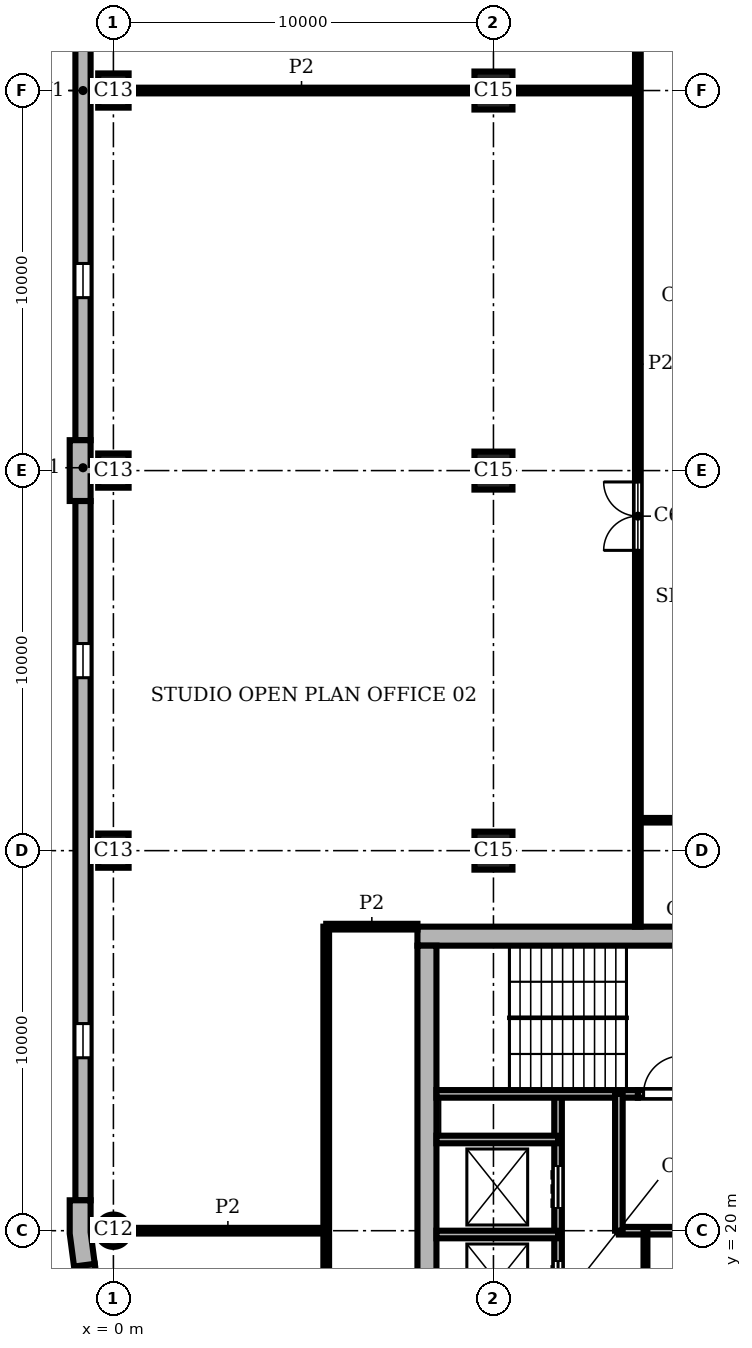
"""IFC4 building model, lengths in metres.
Left out: names, types, materials, properties, quantities, classifications, styles, units other than length and angle.
Written with IfcOpenShell. Run it as: python <this file> out.ifc"""

import sys

from ifc_helpers import new_model, si_unit, direction, frame, frame_2d, origin, origin_2d, place, context, subcontext, project, spatial, polyline, rectangle, circle, outline, extrude, element, fill, save


model = new_model("IFC4")
c1 = context("Model", 3, precision=1e-05, world=origin(), true_north=direction((0.0, 1.0)))
c2 = subcontext(c1, "Body", "Model", "MODEL_VIEW")
j1 = project(units=[si_unit("LENGTHUNIT", "METRE"), si_unit("PLANEANGLEUNIT", "RADIAN")], contexts=[c1])
p1 = place(None, origin())
s1 = spatial("IfcSite", under=j1, at=p1, CompositionType="ELEMENT")
p2 = place(p1, origin())
s2 = spatial("IfcBuilding", under=s1, at=p2, CompositionType="ELEMENT")
p3 = place(p2, frame((0.0, 0.0, 294.3)))
s3 = spatial("IfcBuildingStorey", under=s2, at=p3, CompositionType="ELEMENT", Elevation=294.3)
for number, where, z_axis, x_axis in (
    (1, (0.0, 50.0, 0.0), (0.0, 0.0, 1.0), (0.0, 1.0, 0.0)),
    (2, (0.0, 40.0, 0.0), (0.0, 0.0, 1.0), (0.0, 1.0, 0.0)),
    (3, (0.0, 30.0, 0.0), (0.0, 0.0, 1.0), (0.0, 1.0, 0.0)),
):
    element("IfcColumn", number, at=place(p3, frame(where, z_axis=z_axis, x_axis=x_axis)), inside=s3, PredefinedType="COLUMN", context=c2, shape_type="SweptSolid", body=[
        extrude(rectangle(XDim=0.9, YDim=0.8, at=origin_2d()), origin(), (0.0, 0.0, 1.0), 3.9),
    ])
p4 = place(p3, frame((0.0, 20.0, 0.0), z_axis=(0.0, 0.0, 1.0), x_axis=(1.0, 0.0, 0.0)))
e4 = element("IfcColumn", 4, at=p4, inside=s3, PredefinedType="COLUMN", context=c2, shape_type="SweptSolid", body=[
    extrude(circle(Radius=0.425, at=origin_2d()), origin(), (0.0, 0.0, 1.0), 3.9),
])
for number, where, z_axis, x_axis in (
    (5, (10.0, 30.0, 0.0), (0.0, 0.0, 1.0), (1.0, 0.0, 0.0)),
    (6, (10.0, 40.0, 0.0), (0.0, 0.0, 1.0), (1.0, 0.0, 0.0)),
    (7, (10.0, 50.0, 0.0), (0.0, 0.0, 1.0), (1.0, 0.0, 0.0)),
):
    element("IfcColumn", number, at=place(p3, frame(where, z_axis=z_axis, x_axis=x_axis)), inside=s3, PredefinedType="COLUMN", context=c2, shape_type="SweptSolid", body=[
        extrude(rectangle(XDim=1.0, YDim=1.0, at=origin_2d()), origin(), (0.0, 0.0, 1.0), 3.9),
    ])
p5 = place(p3, frame((28.0, 27.75, 0.0), z_axis=(0.0, 0.0, 1.0), x_axis=(-1.0, 0.0, 0.0)))
e8 = element("IfcWall", 8, at=p5, inside=s3, PredefinedType="SHEAR", context=c2, shape_type="SweptSolid", body=[
    extrude(rectangle(XDim=20.0, YDim=0.5, at=frame_2d((10.0, 0.0))), origin(), (0.0, 0.0, 1.0), 3.9),
])
p6 = place(p3, frame((8.25, 27.5, 0.0), z_axis=(0.0, 0.0, 1.0), x_axis=(0.0, -1.0, 0.0)))
e9 = element("IfcWall", 9, at=p6, inside=s3, PredefinedType="SHEAR", context=c2, shape_type="SweptSolid", body=[
    extrude(rectangle(XDim=19.0, YDim=0.5, at=frame_2d((9.5, 0.0))), origin(), (0.0, 0.0, 1.0), 3.9),
])
p7 = place(p3, origin())
e10 = element("IfcWall", 10, at=p7, inside=s3, PredefinedType="SOLIDWALL", context=c2, shape_type="SweptSolid", body=[
    extrude(outline(polyline([(-0.6, 39.2), (-0.6, 39.85), (-0.45, 39.85), (-0.45, 40.15), (-0.6, 40.15), (-0.6, 40.8), (-1.0, 40.8), (-1.15, 40.8), (-1.15, 40.0), (-1.15, 39.2), (-1.0, 39.2), (-0.6, 39.2)])), origin(), (0.0, 0.0, 1.0), 3.9),
])
e11 = element("IfcWall", 11, at=p7, inside=s3, PredefinedType="SOLIDWALL", context=c2, shape_type="SweptSolid", body=[
    extrude(outline(polyline([(-1.0, 20.8), (-1.15, 20.8), (-1.15, 19.925), (-1.036, 19.057), (-0.887, 19.076), (-0.49, 19.128), (-0.6, 19.961), (-0.6, 20.8), (-1.0, 20.8)])), origin(), (0.0, 0.0, 1.0), 3.9),
])
p8 = place(p3, frame((-0.8, 59.2, 0.0), z_axis=(0.0, 0.0, 1.0), x_axis=(0.0, -1.0, 0.0)))
e12 = element("IfcWall", 12, at=p8, inside=s3, PredefinedType="SOLIDWALL", context=c2, shape_type="SweptSolid", body=[
    extrude(rectangle(XDim=18.4, YDim=0.4, at=frame_2d((9.2, 0.0))), origin(), (0.0, 0.0, 1.0), 3.9),
])
p9 = place(p8, frame((3.75, 0.0, 0.9)))
e13 = element("IfcOpeningElement", 13, at=p9, cuts=e12, PredefinedType="OPENING", context=c2, shape_type="SweptSolid", body=[
    extrude(rectangle(XDim=0.9, YDim=2.35, at=frame_2d((0.45, 1.175))), frame((0.0, 0.21, 0.0), z_axis=(0.0, -1.0, 0.0), x_axis=(1.0, 0.0, 0.0)), (0.0, 0.0, 1.0), 0.42),
])
p10 = place(p8, frame((13.75, 0.0, 0.9)))
e14 = element("IfcOpeningElement", 14, at=p10, cuts=e12, PredefinedType="OPENING", context=c2, shape_type="SweptSolid", body=[
    extrude(rectangle(XDim=0.9, YDim=2.35, at=frame_2d((0.45, 1.175))), frame((0.0, 0.21, 0.0), z_axis=(0.0, -1.0, 0.0), x_axis=(1.0, 0.0, 0.0)), (0.0, 0.0, 1.0), 0.42),
])
p11 = place(p3, frame((-0.8, 39.2, 0.0), z_axis=(0.0, 0.0, 1.0), x_axis=(0.0, -1.0, 0.0)))
e15 = element("IfcWall", 15, at=p11, inside=s3, PredefinedType="SOLIDWALL", context=c2, shape_type="SweptSolid", body=[
    extrude(rectangle(XDim=18.4, YDim=0.4, at=frame_2d((9.2, 0.0))), origin(), (0.0, 0.0, 1.0), 3.9),
])
p12 = place(p11, frame((3.75, 0.0, 0.9)))
e16 = element("IfcOpeningElement", 16, at=p12, cuts=e15, PredefinedType="OPENING", context=c2, shape_type="SweptSolid", body=[
    extrude(rectangle(XDim=0.9, YDim=2.35, at=frame_2d((0.45, 1.175))), frame((0.0, 0.21, 0.0), z_axis=(0.0, -1.0, 0.0), x_axis=(1.0, 0.0, 0.0)), (0.0, 0.0, 1.0), 0.42),
])
p13 = place(p11, frame((13.75, 0.0, 0.9)))
e17 = element("IfcOpeningElement", 17, at=p13, cuts=e15, PredefinedType="OPENING", context=c2, shape_type="SweptSolid", body=[
    extrude(rectangle(XDim=0.9, YDim=2.35, at=frame_2d((0.45, 1.175))), frame((0.0, 0.21, 0.0), z_axis=(0.0, -1.0, 0.0), x_axis=(1.0, 0.0, 0.0)), (0.0, 0.0, 1.0), 0.42),
])
p14 = place(p3, frame((-0.689, 19.102, 0.0), z_axis=(0.0, 0.0, 1.0), x_axis=(0.130514280502, -0.991446429508, 0.0)))
e18 = element("IfcWall", 18, at=p14, inside=s3, PredefinedType="SOLIDWALL", context=c2, shape_type="SweptSolid", body=[
    extrude(rectangle(XDim=4.121, YDim=0.4, at=frame_2d((2.061, 0.0))), origin(), (0.0, 0.0, 1.0), 3.9),
])
p15 = place(p14, frame((1.611, 0.0, 0.9)))
e19 = element("IfcOpeningElement", 19, at=p15, cuts=e18, PredefinedType="OPENING", context=c2, shape_type="SweptSolid", body=[
    extrude(rectangle(XDim=0.9, YDim=2.35, at=frame_2d((0.45, 1.175))), frame((0.0, 0.21, 0.0), z_axis=(0.0, -1.0, 0.0), x_axis=(1.0, 0.0, 0.0)), (0.0, 0.0, 1.0), 0.42),
])
p16 = place(p3, frame((8.5, 19.9, 0.0), z_axis=(0.0, 0.0, 1.0), x_axis=(1.0, 0.0, 0.0)))
e20 = element("IfcWall", 20, at=p16, inside=s3, PredefinedType="SHEAR", context=c2, shape_type="SweptSolid", body=[
    extrude(rectangle(XDim=3.2, YDim=0.2, at=frame_2d((1.6, 0.0))), origin(), (0.0, 0.0, 1.0), 3.58),
])
p17 = place(p3, frame((13.3, 20.0, 0.0), z_axis=(0.0, 0.0, 1.0), x_axis=(1.0, 0.0, 0.0)))
e21 = element("IfcWall", 21, at=p17, inside=s3, PredefinedType="SHEAR", context=c2, shape_type="SweptSolid", body=[
    extrude(rectangle(XDim=4.7, YDim=0.2, at=frame_2d((2.35, 0.0))), origin(), (0.0, 0.0, 1.0), 3.58),
])
p18 = place(p3, frame((8.5, 22.4, 0.0), z_axis=(0.0, 0.0, 1.0), x_axis=(1.0, 0.0, 0.0)))
e22 = element("IfcWall", 22, at=p18, inside=s3, PredefinedType="SHEAR", context=c2, shape_type="SweptSolid", body=[
    extrude(rectangle(XDim=3.2, YDim=0.2, at=frame_2d((1.6, 0.0))), origin(), (0.0, 0.0, 1.0), 3.58),
])
p19 = place(p3, frame((8.5, 23.6, 0.0), z_axis=(0.0, 0.0, 1.0), x_axis=(1.0, 0.0, 0.0)))
e23 = element("IfcWall", 23, at=p19, inside=s3, PredefinedType="SHEAR", context=c2, shape_type="SweptSolid", body=[
    extrude(rectangle(XDim=5.3, YDim=0.2, at=frame_2d((2.65, 0.0))), origin(), (0.0, 0.0, 1.0), 3.58),
])
p20 = place(p3, frame((13.8, 23.6, 0.0), z_axis=(0.0, 0.0, 1.0), x_axis=(1.0, 0.0, 0.0)))
e24 = element("IfcWall", 24, at=p20, inside=s3, PredefinedType="SHEAR", context=c2, shape_type="SweptSolid", body=[
    extrude(rectangle(XDim=13.7, YDim=0.2, at=frame_2d((6.85, 0.0))), origin(), (0.0, 0.0, 1.0), 3.58),
])
p21 = place(p20, frame((2.4, 0.0, 0.0)))
e25 = element("IfcOpeningElement", 25, at=p21, cuts=e24, PredefinedType="OPENING", context=c2, shape_type="SweptSolid", body=[
    extrude(rectangle(XDim=1.1, YDim=2.1, at=frame_2d((0.55, 1.05))), frame((0.0, 0.11, 0.0), z_axis=(0.0, -1.0, 0.0), x_axis=(1.0, 0.0, 0.0)), (0.0, 0.0, 1.0), 0.22),
])
p22 = place(p20, frame((4.9, 0.0, 0.0)))
e26 = element("IfcOpeningElement", 26, at=p22, cuts=e24, PredefinedType="OPENING", context=c2, shape_type="SweptSolid", body=[
    extrude(rectangle(XDim=1.1, YDim=2.1, at=frame_2d((0.55, 1.05))), frame((0.0, 0.11, 0.0), z_axis=(0.0, -1.0, 0.0), x_axis=(1.0, 0.0, 0.0)), (0.0, 0.0, 1.0), 0.22),
])
p23 = place(p20, frame((0.15, 0.0, 0.0)))
e27 = element("IfcOpeningElement", 27, at=p23, cuts=e24, PredefinedType="OPENING", context=c2, shape_type="SweptSolid", body=[
    extrude(rectangle(XDim=1.0, YDim=2.1, at=frame_2d((0.5, 1.05))), frame((0.0, 0.11, 0.0), z_axis=(0.0, -1.0, 0.0), x_axis=(1.0, 0.0, 0.0)), (0.0, 0.0, 1.0), 0.22),
])
p24 = place(p3, frame((11.7, 12.4, 0.0), z_axis=(0.0, 0.0, 1.0), x_axis=(0.0, 1.0, 0.0)))
e28 = element("IfcWall", 28, at=p24, inside=s3, PredefinedType="SHEAR", context=c2, shape_type="SweptSolid", body=[
    extrude(rectangle(XDim=11.2, YDim=0.2, at=frame_2d((5.6, 0.0))), origin(), (0.0, 0.0, 1.0), 3.58),
])
p25 = place(p24, frame((0.7, 0.0, 0.0)))
e29 = element("IfcOpeningElement", 29, at=p25, cuts=e28, PredefinedType="OPENING", context=c2, shape_type="SweptSolid", body=[
    extrude(rectangle(XDim=1.1, YDim=2.1, at=frame_2d((0.55, 1.05))), frame((0.0, 0.11, 0.0), z_axis=(0.0, -1.0, 0.0), x_axis=(1.0, 0.0, 0.0)), (0.0, 0.0, 1.0), 0.22),
])
p26 = place(p24, frame((3.2, 0.0, 0.0)))
e30 = element("IfcOpeningElement", 30, at=p26, cuts=e28, PredefinedType="OPENING", context=c2, shape_type="SweptSolid", body=[
    extrude(rectangle(XDim=1.1, YDim=2.1, at=frame_2d((0.55, 1.05))), frame((0.0, 0.11, 0.0), z_axis=(0.0, -1.0, 0.0), x_axis=(1.0, 0.0, 0.0)), (0.0, 0.0, 1.0), 0.22),
])
p27 = place(p24, frame((5.7, 0.0, 0.0)))
e31 = element("IfcOpeningElement", 31, at=p27, cuts=e28, PredefinedType="OPENING", context=c2, shape_type="SweptSolid", body=[
    extrude(rectangle(XDim=1.1, YDim=2.1, at=frame_2d((0.55, 1.05))), frame((0.0, 0.11, 0.0), z_axis=(0.0, -1.0, 0.0), x_axis=(1.0, 0.0, 0.0)), (0.0, 0.0, 1.0), 0.22),
])
p28 = place(p24, frame((8.2, 0.0, 0.0)))
e32 = element("IfcOpeningElement", 32, at=p28, cuts=e28, PredefinedType="OPENING", context=c2, shape_type="SweptSolid", body=[
    extrude(rectangle(XDim=1.1, YDim=2.1, at=frame_2d((0.55, 1.05))), frame((0.0, 0.11, 0.0), z_axis=(0.0, -1.0, 0.0), x_axis=(1.0, 0.0, 0.0)), (0.0, 0.0, 1.0), 0.22),
])
p29 = place(p3, frame((13.3, 20.0, 0.0), z_axis=(0.0, 0.0, 1.0), x_axis=(0.0, 1.0, 0.0)))
e33 = element("IfcWall", 33, at=p29, inside=s3, PredefinedType="SHEAR", context=c2, shape_type="SweptSolid", body=[
    extrude(rectangle(XDim=3.6, YDim=0.2, at=frame_2d((1.8, 0.0))), origin(), (0.0, 0.0, 1.0), 3.58),
])
p30 = place(p3, frame((14.0, 16.2, 0.0), z_axis=(0.0, 0.0, 1.0), x_axis=(0.0, 1.0, 0.0)))
e34 = element("IfcWall", 34, at=p30, inside=s3, PredefinedType="PARTITIONING", context=c2, shape_type="SweptSolid", body=[
    extrude(rectangle(XDim=3.8, YDim=0.1, at=frame_2d((1.9, 0.0))), origin(), (0.0, 0.0, 1.0), 3.58),
])
p31 = place(p3, frame((5.6, 5.6, 0.0), z_axis=(0.0, 0.0, 1.0), x_axis=(0.0, 1.0, 0.0)))
e35 = element("IfcWall", 35, at=p31, inside=s3, PredefinedType="PARTITIONING", context=c2, shape_type="SweptSolid", body=[
    extrude(rectangle(XDim=22.4, YDim=0.15, at=frame_2d((11.2, 0.0))), origin(), (0.0, 0.0, 1.0), 3.58),
])
p32 = place(p31, frame((4.1, 0.0, 0.0)))
e36 = element("IfcOpeningElement", 36, at=p32, cuts=e35, PredefinedType="OPENING", context=c2, shape_type="SweptSolid", body=[
    extrude(rectangle(XDim=0.8, YDim=2.1, at=frame_2d((0.4, 1.05))), frame((0.0, 0.085, 0.0), z_axis=(0.0, -1.0, 0.0), x_axis=(1.0, 0.0, 0.0)), (0.0, 0.0, 1.0), 0.17),
])
p33 = place(p31, frame((11.5, 0.0, 0.0)))
e37 = element("IfcOpeningElement", 37, at=p33, cuts=e35, PredefinedType="OPENING", context=c2, shape_type="SweptSolid", body=[
    extrude(rectangle(XDim=1.1, YDim=2.1, at=frame_2d((0.55, 1.05))), frame((0.0, 0.085, 0.0), z_axis=(0.0, -1.0, 0.0), x_axis=(1.0, 0.0, 0.0)), (0.0, 0.0, 1.0), 0.17),
])
p34 = place(p3, frame((13.8, 28.0, 0.0), z_axis=(0.0, 0.0, 1.0), x_axis=(0.0, 1.0, 0.0)))
e38 = element("IfcWall", 38, at=p34, inside=s3, PredefinedType="PARTITIONING", context=c2, shape_type="SweptSolid", body=[
    extrude(rectangle(XDim=29.6, YDim=0.15, at=frame_2d((14.8, 0.0))), origin(), (0.0, 0.0, 1.0), 3.58),
])
p35 = place(p34, frame((9.901, 0.0, 0.0)))
e39 = element("IfcOpeningElement", 39, at=p35, cuts=e38, PredefinedType="OPENING", context=c2, shape_type="SweptSolid", body=[
    extrude(rectangle(XDim=1.8, YDim=2.1, at=frame_2d((0.9, 1.05))), frame((0.0, 0.085, 0.0), z_axis=(0.0, -1.0, 0.0), x_axis=(1.0, 0.0, 0.0)), (0.0, 0.0, 1.0), 0.17),
])
p36 = place(p3, frame((0.425, 20.0, 0.0), z_axis=(0.0, 0.0, 1.0), x_axis=(1.0, 0.0, 0.0)))
e40 = element("IfcWall", 40, at=p36, inside=s3, PredefinedType="PARTITIONING", context=c2, shape_type="SweptSolid", body=[
    extrude(rectangle(XDim=5.175, YDim=0.15, at=frame_2d((2.587, 0.0))), origin(), (0.0, 0.0, 1.0), 3.58),
])
p37 = place(p3, frame((5.6, 28.0, 0.0), z_axis=(0.0, 0.0, 1.0), x_axis=(1.0, 0.0, 0.0)))
e41 = element("IfcWall", 41, at=p37, inside=s3, PredefinedType="PARTITIONING", context=c2, shape_type="SweptSolid", body=[
    extrude(rectangle(XDim=2.4, YDim=0.15, at=frame_2d((1.2, 0.0))), origin(), (0.0, 0.0, 1.0), 3.58),
])
p38 = place(p3, frame((0.4, 50.0, 0.0), z_axis=(0.0, 0.0, 1.0), x_axis=(1.0, 0.0, 0.0)))
e42 = element("IfcWall", 42, at=p38, inside=s3, PredefinedType="PARTITIONING", context=c2, shape_type="SweptSolid", body=[
    extrude(rectangle(XDim=9.1, YDim=0.15, at=frame_2d((4.55, 0.0))), origin(), (0.0, 0.0, 1.0), 3.58),
])
p39 = place(p3, frame((10.5, 50.0, 0.0), z_axis=(0.0, 0.0, 1.0), x_axis=(1.0, 0.0, 0.0)))
e43 = element("IfcWall", 43, at=p39, inside=s3, PredefinedType="PARTITIONING", context=c2, shape_type="SweptSolid", body=[
    extrude(rectangle(XDim=3.3, YDim=0.15, at=frame_2d((1.65, 0.0))), origin(), (0.0, 0.0, 1.0), 3.58),
])
p40 = place(p3, frame((13.802, 30.8, 0.0), z_axis=(0.0, 0.0, 1.0), x_axis=(1.0, 0.0, 0.0)))
e44 = element("IfcWall", 44, at=p40, inside=s3, PredefinedType="PARTITIONING", context=c2, shape_type="SweptSolid", body=[
    extrude(rectangle(XDim=16.798, YDim=0.12, at=frame_2d((8.399, 0.0))), origin(), (0.0, 0.0, 1.0), 3.58),
])
p41 = place(p40, frame((7.35, 0.0, 0.0)))
e45 = element("IfcOpeningElement", 45, at=p41, cuts=e44, PredefinedType="OPENING", context=c2, shape_type="SweptSolid", body=[
    extrude(rectangle(XDim=1.8, YDim=2.1, at=frame_2d((0.9, 1.05))), frame((0.0, 0.07, 0.0), z_axis=(0.0, -1.0, 0.0), x_axis=(1.0, 0.0, 0.0)), (0.0, 0.0, 1.0), 0.14),
])
p42 = place(p10, origin())
e46 = element("IfcWindow", 46, at=p42, inside=s3, PartitioningType="SINGLE_PANEL", PredefinedType="WINDOW", context=c2, shape_type="SweptSolid", body=[
    extrude(rectangle(XDim=0.9, YDim=2.35, at=frame_2d((0.45, 1.175))), frame((0.0, 0.16, 0.0), z_axis=(0.0, -1.0, 0.0), x_axis=(1.0, 0.0, 0.0)), (0.0, 0.0, 1.0), 0.06),
])
fill(e14, e46)
p43 = place(p12, origin())
e47 = element("IfcWindow", 47, at=p43, inside=s3, PartitioningType="SINGLE_PANEL", PredefinedType="WINDOW", context=c2, shape_type="SweptSolid", body=[
    extrude(rectangle(XDim=0.9, YDim=2.35, at=frame_2d((0.45, 1.175))), frame((0.0, 0.16, 0.0), z_axis=(0.0, -1.0, 0.0), x_axis=(1.0, 0.0, 0.0)), (0.0, 0.0, 1.0), 0.06),
])
fill(e16, e47)
p44 = place(p13, origin())
e48 = element("IfcWindow", 48, at=p44, inside=s3, PartitioningType="SINGLE_PANEL", PredefinedType="WINDOW", context=c2, shape_type="SweptSolid", body=[
    extrude(rectangle(XDim=0.9, YDim=2.35, at=frame_2d((0.45, 1.175))), frame((0.0, 0.16, 0.0), z_axis=(0.0, -1.0, 0.0), x_axis=(1.0, 0.0, 0.0)), (0.0, 0.0, 1.0), 0.06),
])
fill(e17, e48)
p45 = place(p27, origin())
e49 = element("IfcDoor", 49, at=p45, inside=s3, OperationType="DOUBLE_DOOR_SLIDING", PredefinedType="DOOR", context=c2, shape_type="SweptSolid", body=[
    extrude(rectangle(XDim=1.1, YDim=2.1, at=frame_2d((0.55, 1.05))), frame((0.0, 0.025, 0.0), z_axis=(0.0, -1.0, 0.0), x_axis=(1.0, 0.0, 0.0)), (0.0, 0.0, 1.0), 0.05),
])
fill(e31, e49)
p46 = place(p28, origin())
e50 = element("IfcDoor", 50, at=p46, inside=s3, OperationType="DOUBLE_DOOR_SLIDING", PredefinedType="DOOR", context=c2, shape_type="SweptSolid", body=[
    extrude(rectangle(XDim=1.1, YDim=2.1, at=frame_2d((0.55, 1.05))), frame((0.0, 0.025, 0.0), z_axis=(0.0, -1.0, 0.0), x_axis=(1.0, 0.0, 0.0)), (0.0, 0.0, 1.0), 0.05),
])
fill(e32, e50)
p47 = place(p23, origin())
e51 = element("IfcDoor", 51, at=p47, inside=s3, OperationType="SINGLE_SWING_RIGHT", PredefinedType="DOOR", context=c2, shape_type="SweptSolid", body=[
    extrude(rectangle(XDim=1.0, YDim=2.1, at=frame_2d((0.5, 1.05))), frame((0.0, 0.025, 0.0), z_axis=(0.0, -1.0, 0.0), x_axis=(1.0, 0.0, 0.0)), (0.0, 0.0, 1.0), 0.05),
])
fill(e27, e51)
p48 = place(p35, origin())
e52 = element("IfcDoor", 52, at=p48, inside=s3, OperationType="DOUBLE_DOOR_SINGLE_SWING", PredefinedType="DOOR", context=c2, shape_type="SweptSolid", body=[
    extrude(rectangle(XDim=1.8, YDim=2.1, at=frame_2d((0.9, 1.05))), frame((0.0, 0.025, 0.0), z_axis=(0.0, -1.0, 0.0), x_axis=(1.0, 0.0, 0.0)), (0.0, 0.0, 1.0), 0.05),
])
fill(e39, e52)
save(model, sys.argv[1])
